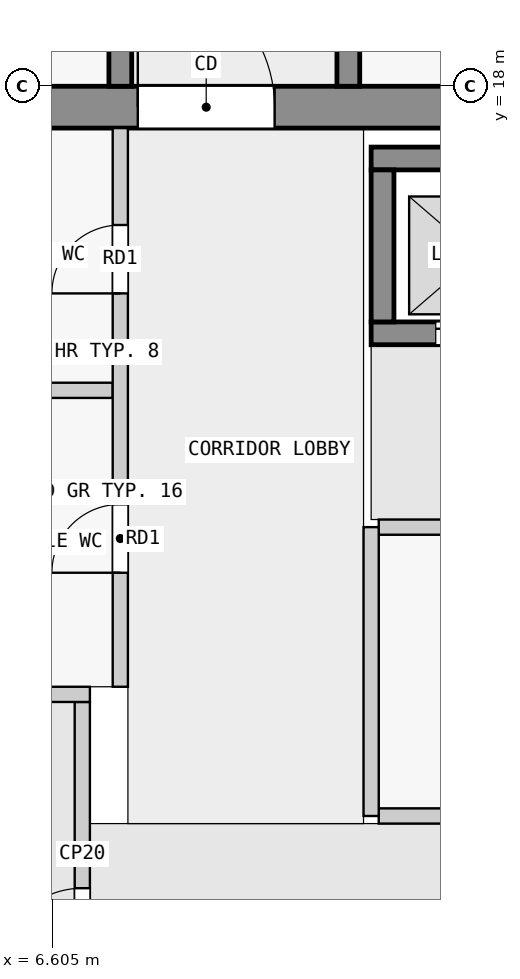
"""IFC4 building model, lengths in metres.
Left out: names, types, materials, properties, quantities, classifications, styles, units other than length and angle.
Written with IfcOpenShell. Run it as: python <this file> out.ifc"""

import sys

from ifc_helpers import new_model, si_unit, direction, frame, frame_2d, origin, place, context, subcontext, project, spatial, rectangle, extrude, element, fill, save


model = new_model("IFC4")
c1 = context("Model", 3, precision=1e-05, world=origin(), true_north=direction((0.0, 1.0)))
c2 = subcontext(c1, "Body", "Model", "MODEL_VIEW")
j1 = project(units=[si_unit("LENGTHUNIT", "METRE"), si_unit("PLANEANGLEUNIT", "RADIAN")], contexts=[c1])
p1 = place(None, origin())
s1 = spatial("IfcSite", under=j1, at=p1, CompositionType="ELEMENT")
p2 = place(p1, origin())
s2 = spatial("IfcBuilding", under=s1, at=p2, CompositionType="ELEMENT")
p3 = place(p2, frame((0.0, 0.0, 181.4)))
s3 = spatial("IfcBuildingStorey", under=s2, at=p3, CompositionType="ELEMENT", Elevation=181.4)
p4 = place(p3, frame((1.38, 17.725, 0.0), z_axis=(0.0, 0.0, 1.0), x_axis=(1.0, 0.0, 0.0)))
e1 = element("IfcWall", 1, at=p4, inside=s3, PredefinedType="SHEAR", context=c2, shape_type="SweptSolid", body=[
    extrude(rectangle(XDim=21.12, YDim=0.55, at=frame_2d((10.56, 0.0))), origin(), (0.0, 0.0, 1.0), 3.2),
])
p5 = place(p4, frame((6.35, 0.0, 0.0)))
e2 = element("IfcOpeningElement", 2, at=p5, cuts=e1, PredefinedType="OPENING", context=c2, shape_type="SweptSolid", body=[
    extrude(rectangle(XDim=1.8, YDim=2.1, at=frame_2d((0.9, 1.05))), frame((0.0, 0.285, 0.0), z_axis=(0.0, -1.0, 0.0), x_axis=(1.0, 0.0, 0.0)), (0.0, 0.0, 1.0), 0.57),
])
p6 = place(p3, frame((10.8, 17.05, 0.0), z_axis=(0.0, 0.0, 1.0), x_axis=(1.0, 0.0, 0.0)))
e3 = element("IfcWall", 3, at=p6, inside=s3, PredefinedType="SHEAR", context=c2, shape_type="SweptSolid", body=[
    extrude(rectangle(XDim=7.8, YDim=0.3, at=frame_2d((3.9, 0.0))), origin(), (0.0, 0.0, 1.0), 3.2),
])
p7 = place(p3, frame((10.8, 14.75, 0.0), z_axis=(0.0, 0.0, 1.0), x_axis=(1.0, 0.0, 0.0)))
e4 = element("IfcWall", 4, at=p7, inside=s3, PredefinedType="SHEAR", context=c2, shape_type="SweptSolid", body=[
    extrude(rectangle(XDim=7.8, YDim=0.3, at=frame_2d((3.9, 0.0))), origin(), (0.0, 0.0, 1.0), 3.2),
])
p8 = place(p7, frame((0.85, 0.0, 0.0)))
e5 = element("IfcOpeningElement", 5, at=p8, cuts=e4, PredefinedType="OPENING", context=c2, shape_type="SweptSolid", body=[
    extrude(rectangle(XDim=1.1, YDim=2.1, at=frame_2d((0.55, 1.05))), frame((0.0, 0.16, 0.0), z_axis=(0.0, -1.0, 0.0), x_axis=(1.0, 0.0, 0.0)), (0.0, 0.0, 1.0), 0.32),
])
p9 = place(p7, frame((3.35, 0.0, 0.0)))
e6 = element("IfcOpeningElement", 6, at=p9, cuts=e4, PredefinedType="OPENING", context=c2, shape_type="SweptSolid", body=[
    extrude(rectangle(XDim=1.1, YDim=2.1, at=frame_2d((0.55, 1.05))), frame((0.0, 0.16, 0.0), z_axis=(0.0, -1.0, 0.0), x_axis=(1.0, 0.0, 0.0)), (0.0, 0.0, 1.0), 0.32),
])
p10 = place(p7, frame((5.85, 0.0, 0.0)))
e7 = element("IfcOpeningElement", 7, at=p10, cuts=e4, PredefinedType="OPENING", context=c2, shape_type="SweptSolid", body=[
    extrude(rectangle(XDim=1.1, YDim=2.1, at=frame_2d((0.55, 1.05))), frame((0.0, 0.16, 0.0), z_axis=(0.0, -1.0, 0.0), x_axis=(1.0, 0.0, 0.0)), (0.0, 0.0, 1.0), 0.32),
])
p11 = place(p3, frame((10.95, 14.9, 0.0), z_axis=(0.0, 0.0, 1.0), x_axis=(0.0, 1.0, 0.0)))
e8 = element("IfcWall", 8, at=p11, inside=s3, PredefinedType="SHEAR", context=c2, shape_type="SweptSolid", body=[
    extrude(rectangle(XDim=2.0, YDim=0.3, at=frame_2d((1.0, 0.0))), origin(), (0.0, 0.0, 1.0), 3.2),
])
p12 = place(p3, frame((7.5, 18.0, 0.0), z_axis=(0.0, 0.0, 1.0), x_axis=(0.0, 1.0, 0.0)))
e9 = element("IfcWall", 9, at=p12, inside=s3, PredefinedType="SHEAR", context=c2, shape_type="SweptSolid", body=[
    extrude(rectangle(XDim=27.0, YDim=0.3, at=frame_2d((13.5, 0.0))), origin(), (0.0, 0.0, 1.0), 3.2),
])
p13 = place(p12, frame((1.75, 0.0, 0.0)))
e10 = element("IfcOpeningElement", 10, at=p13, cuts=e9, PredefinedType="OPENING", context=c2, shape_type="SweptSolid", body=[
    extrude(rectangle(XDim=1.0, YDim=2.1, at=frame_2d((0.5, 1.05))), frame((0.0, 0.16, 0.0), z_axis=(0.0, -1.0, 0.0), x_axis=(1.0, 0.0, 0.0)), (0.0, 0.0, 1.0), 0.32),
])
p14 = place(p12, frame((11.45, 0.0, 0.0)))
e11 = element("IfcOpeningElement", 11, at=p14, cuts=e9, PredefinedType="OPENING", context=c2, shape_type="SweptSolid", body=[
    extrude(rectangle(XDim=1.0, YDim=2.1, at=frame_2d((0.5, 1.05))), frame((0.0, 0.16, 0.0), z_axis=(0.0, -1.0, 0.0), x_axis=(1.0, 0.0, 0.0)), (0.0, 0.0, 1.0), 0.32),
])
p15 = place(p12, frame((19.75, 0.0, 0.0)))
e12 = element("IfcOpeningElement", 12, at=p15, cuts=e9, PredefinedType="OPENING", context=c2, shape_type="SweptSolid", body=[
    extrude(rectangle(XDim=1.0, YDim=2.1, at=frame_2d((0.5, 1.05))), frame((0.0, 0.16, 0.0), z_axis=(0.0, -1.0, 0.0), x_axis=(1.0, 0.0, 0.0)), (0.0, 0.0, 1.0), 0.32),
])
p16 = place(p12, frame((23.25, 0.0, 0.0)))
e13 = element("IfcOpeningElement", 13, at=p16, cuts=e9, PredefinedType="OPENING", context=c2, shape_type="SweptSolid", body=[
    extrude(rectangle(XDim=0.9, YDim=2.1, at=frame_2d((0.45, 1.05))), frame((0.0, 0.16, 0.0), z_axis=(0.0, -1.0, 0.0), x_axis=(1.0, 0.0, 0.0)), (0.0, 0.0, 1.0), 0.32),
])
p17 = place(p12, frame((25.45, 0.0, 0.0)))
e14 = element("IfcOpeningElement", 14, at=p17, cuts=e9, PredefinedType="OPENING", context=c2, shape_type="SweptSolid", body=[
    extrude(rectangle(XDim=1.0, YDim=2.1, at=frame_2d((0.5, 1.05))), frame((0.0, 0.16, 0.0), z_axis=(0.0, -1.0, 0.0), x_axis=(1.0, 0.0, 0.0)), (0.0, 0.0, 1.0), 0.32),
])
p18 = place(p3, frame((10.5, 18.0, 0.0), z_axis=(0.0, 0.0, 1.0), x_axis=(0.0, 1.0, 0.0)))
e15 = element("IfcWall", 15, at=p18, inside=s3, PredefinedType="SHEAR", context=c2, shape_type="SweptSolid", body=[
    extrude(rectangle(XDim=27.0, YDim=0.3, at=frame_2d((13.5, 0.0))), origin(), (0.0, 0.0, 1.0), 3.2),
])
p19 = place(p18, frame((4.05, 0.0, 0.0)))
e16 = element("IfcOpeningElement", 16, at=p19, cuts=e15, PredefinedType="OPENING", context=c2, shape_type="SweptSolid", body=[
    extrude(rectangle(XDim=1.0, YDim=2.1, at=frame_2d((0.5, 1.05))), frame((0.0, 0.16, 0.0), z_axis=(0.0, -1.0, 0.0), x_axis=(1.0, 0.0, 0.0)), (0.0, 0.0, 1.0), 0.32),
])
p20 = place(p18, frame((13.05, 0.0, 0.0)))
e17 = element("IfcOpeningElement", 17, at=p20, cuts=e15, PredefinedType="OPENING", context=c2, shape_type="SweptSolid", body=[
    extrude(rectangle(XDim=1.0, YDim=2.1, at=frame_2d((0.5, 1.05))), frame((0.0, 0.16, 0.0), z_axis=(0.0, -1.0, 0.0), x_axis=(1.0, 0.0, 0.0)), (0.0, 0.0, 1.0), 0.32),
])
p21 = place(p18, frame((21.35, 0.0, 0.0)))
e18 = element("IfcOpeningElement", 18, at=p21, cuts=e15, PredefinedType="OPENING", context=c2, shape_type="SweptSolid", body=[
    extrude(rectangle(XDim=1.0, YDim=2.1, at=frame_2d((0.5, 1.05))), frame((0.0, 0.16, 0.0), z_axis=(0.0, -1.0, 0.0), x_axis=(1.0, 0.0, 0.0)), (0.0, 0.0, 1.0), 0.32),
])
p22 = place(p3, frame((7.0, 5.9, 0.0), z_axis=(0.0, 0.0, 1.0), x_axis=(0.0, 1.0, 0.0)))
e19 = element("IfcWall", 19, at=p22, inside=s3, PredefinedType="PARTITIONING", context=c2, shape_type="SweptSolid", body=[
    extrude(rectangle(XDim=4.0, YDim=0.2, at=frame_2d((2.0, 0.0))), origin(), (0.0, 0.0, 1.0), 3.2),
])
p23 = place(p22, frame((0.45, 0.0, 0.0)))
e20 = element("IfcOpeningElement", 20, at=p23, cuts=e19, PredefinedType="OPENING", context=c2, shape_type="SweptSolid", body=[
    extrude(rectangle(XDim=1.1, YDim=2.1, at=frame_2d((0.55, 1.05))), frame((0.0, 0.11, 0.0), z_axis=(0.0, -1.0, 0.0), x_axis=(1.0, 0.0, 0.0)), (0.0, 0.0, 1.0), 0.22),
])
p24 = place(p3, frame((5.15, 10.0, 0.0), z_axis=(0.0, 0.0, 1.0), x_axis=(1.0, 0.0, 0.0)))
e21 = element("IfcWall", 21, at=p24, inside=s3, PredefinedType="PARTITIONING", context=c2, shape_type="SweptSolid", body=[
    extrude(rectangle(XDim=1.95, YDim=0.2, at=frame_2d((0.975, 0.0))), origin(), (0.0, 0.0, 1.0), 3.2),
])
p25 = place(p3, frame((10.8, 8.4, 0.0), z_axis=(0.0, 0.0, 1.0), x_axis=(0.0, 1.0, 0.0)))
e22 = element("IfcWall", 22, at=p25, inside=s3, PredefinedType="PARTITIONING", context=c2, shape_type="SweptSolid", body=[
    extrude(rectangle(XDim=3.8, YDim=0.2, at=frame_2d((1.9, 0.0))), origin(), (0.0, 0.0, 1.0), 3.2),
])
p26 = place(p3, frame((10.9, 8.4, 0.0), z_axis=(0.0, 0.0, 1.0), x_axis=(1.0, 0.0, 0.0)))
e23 = element("IfcWall", 23, at=p26, inside=s3, PredefinedType="PARTITIONING", context=c2, shape_type="SweptSolid", body=[
    extrude(rectangle(XDim=6.15, YDim=0.2, at=frame_2d((3.075, 0.0))), origin(), (0.0, 0.0, 1.0), 3.2),
])
p27 = place(p3, frame((10.9, 12.2, 0.0), z_axis=(0.0, 0.0, 1.0), x_axis=(1.0, 0.0, 0.0)))
e24 = element("IfcWall", 24, at=p27, inside=s3, PredefinedType="PARTITIONING", context=c2, shape_type="SweptSolid", body=[
    extrude(rectangle(XDim=6.15, YDim=0.2, at=frame_2d((3.075, 0.0))), origin(), (0.0, 0.0, 1.0), 3.2),
])
p28 = place(p27, frame((2.625, 0.0, 0.0)))
e25 = element("IfcOpeningElement", 25, at=p28, cuts=e24, PredefinedType="OPENING", context=c2, shape_type="SweptSolid", body=[
    extrude(rectangle(XDim=0.9, YDim=2.1, at=frame_2d((0.45, 1.05))), frame((0.0, 0.11, 0.0), z_axis=(0.0, -1.0, 0.0), x_axis=(1.0, 0.0, 0.0)), (0.0, 0.0, 1.0), 0.22),
])
p29 = place(p3, frame((7.5, 10.1, 0.0), z_axis=(0.0, 0.0, 1.0), x_axis=(0.0, 1.0, 0.0)))
e26 = element("IfcWall", 26, at=p29, inside=s3, PredefinedType="PARTITIONING", context=c2, shape_type="SweptSolid", body=[
    extrude(rectangle(XDim=7.35, YDim=0.2, at=frame_2d((3.675, 0.0))), origin(), (0.0, 0.0, 1.0), 3.2),
])
p30 = place(p29, frame((1.5, 0.0, 0.0)))
e27 = element("IfcOpeningElement", 27, at=p30, cuts=e26, PredefinedType="OPENING", context=c2, shape_type="SweptSolid", body=[
    extrude(rectangle(XDim=0.9, YDim=2.1, at=frame_2d((0.45, 1.05))), frame((0.0, 0.11, 0.0), z_axis=(0.0, -1.0, 0.0), x_axis=(1.0, 0.0, 0.0)), (0.0, 0.0, 1.0), 0.22),
])
p31 = place(p29, frame((5.175, 0.0, 0.0)))
e28 = element("IfcOpeningElement", 28, at=p31, cuts=e26, PredefinedType="OPENING", context=c2, shape_type="SweptSolid", body=[
    extrude(rectangle(XDim=0.9, YDim=2.1, at=frame_2d((0.45, 1.05))), frame((0.0, 0.11, 0.0), z_axis=(0.0, -1.0, 0.0), x_axis=(1.0, 0.0, 0.0)), (0.0, 0.0, 1.0), 0.22),
])
p32 = place(p3, frame((5.15, 14.0, 0.0), z_axis=(0.0, 0.0, 1.0), x_axis=(1.0, 0.0, 0.0)))
e29 = element("IfcWall", 29, at=p32, inside=s3, PredefinedType="PARTITIONING", context=c2, shape_type="SweptSolid", body=[
    extrude(rectangle(XDim=2.25, YDim=0.2, at=frame_2d((1.125, 0.0))), origin(), (0.0, 0.0, 1.0), 3.2),
])
p33 = place(p23, origin())
e30 = element("IfcDoor", 30, at=p33, inside=s3, OperationType="SINGLE_SWING_LEFT", PredefinedType="DOOR", context=c2, shape_type="SweptSolid", body=[
    extrude(rectangle(XDim=1.1, YDim=2.1, at=frame_2d((0.55, 1.05))), frame((0.0, 0.025, 0.0), z_axis=(0.0, -1.0, 0.0), x_axis=(1.0, 0.0, 0.0)), (0.0, 0.0, 1.0), 0.05),
])
fill(e20, e30)
p34 = place(p8, origin())
e31 = element("IfcDoor", 31, at=p34, inside=s3, OperationType="DOUBLE_DOOR_SLIDING", PredefinedType="DOOR", context=c2, shape_type="SweptSolid", body=[
    extrude(rectangle(XDim=1.1, YDim=2.1, at=frame_2d((0.55, 1.05))), frame((0.0, 0.025, 0.0), z_axis=(0.0, -1.0, 0.0), x_axis=(1.0, 0.0, 0.0)), (0.0, 0.0, 1.0), 0.05),
])
fill(e5, e31)
p35 = place(p5, origin())
e32 = element("IfcDoor", 32, at=p35, inside=s3, OperationType="DOUBLE_DOOR_SINGLE_SWING", PredefinedType="DOOR", context=c2, shape_type="SweptSolid", body=[
    extrude(rectangle(XDim=1.8, YDim=2.1, at=frame_2d((0.9, 1.05))), frame((0.0, 0.025, 0.0), z_axis=(0.0, -1.0, 0.0), x_axis=(1.0, 0.0, 0.0)), (0.0, 0.0, 1.0), 0.05),
])
fill(e2, e32)
p36 = place(p30, origin())
e33 = element("IfcDoor", 33, at=p36, inside=s3, OperationType="SINGLE_SWING_RIGHT", PredefinedType="DOOR", context=c2, shape_type="SweptSolid", body=[
    extrude(rectangle(XDim=0.9, YDim=2.1, at=frame_2d((0.45, 1.05))), frame((0.0, 0.025, 0.0), z_axis=(0.0, -1.0, 0.0), x_axis=(1.0, 0.0, 0.0)), (0.0, 0.0, 1.0), 0.05),
])
fill(e27, e33)
p37 = place(p31, origin())
e34 = element("IfcDoor", 34, at=p37, inside=s3, OperationType="SINGLE_SWING_RIGHT", PredefinedType="DOOR", context=c2, shape_type="SweptSolid", body=[
    extrude(rectangle(XDim=0.9, YDim=2.1, at=frame_2d((0.45, 1.05))), frame((0.0, 0.025, 0.0), z_axis=(0.0, -1.0, 0.0), x_axis=(1.0, 0.0, 0.0)), (0.0, 0.0, 1.0), 0.05),
])
fill(e28, e34)
save(model, sys.argv[1])
